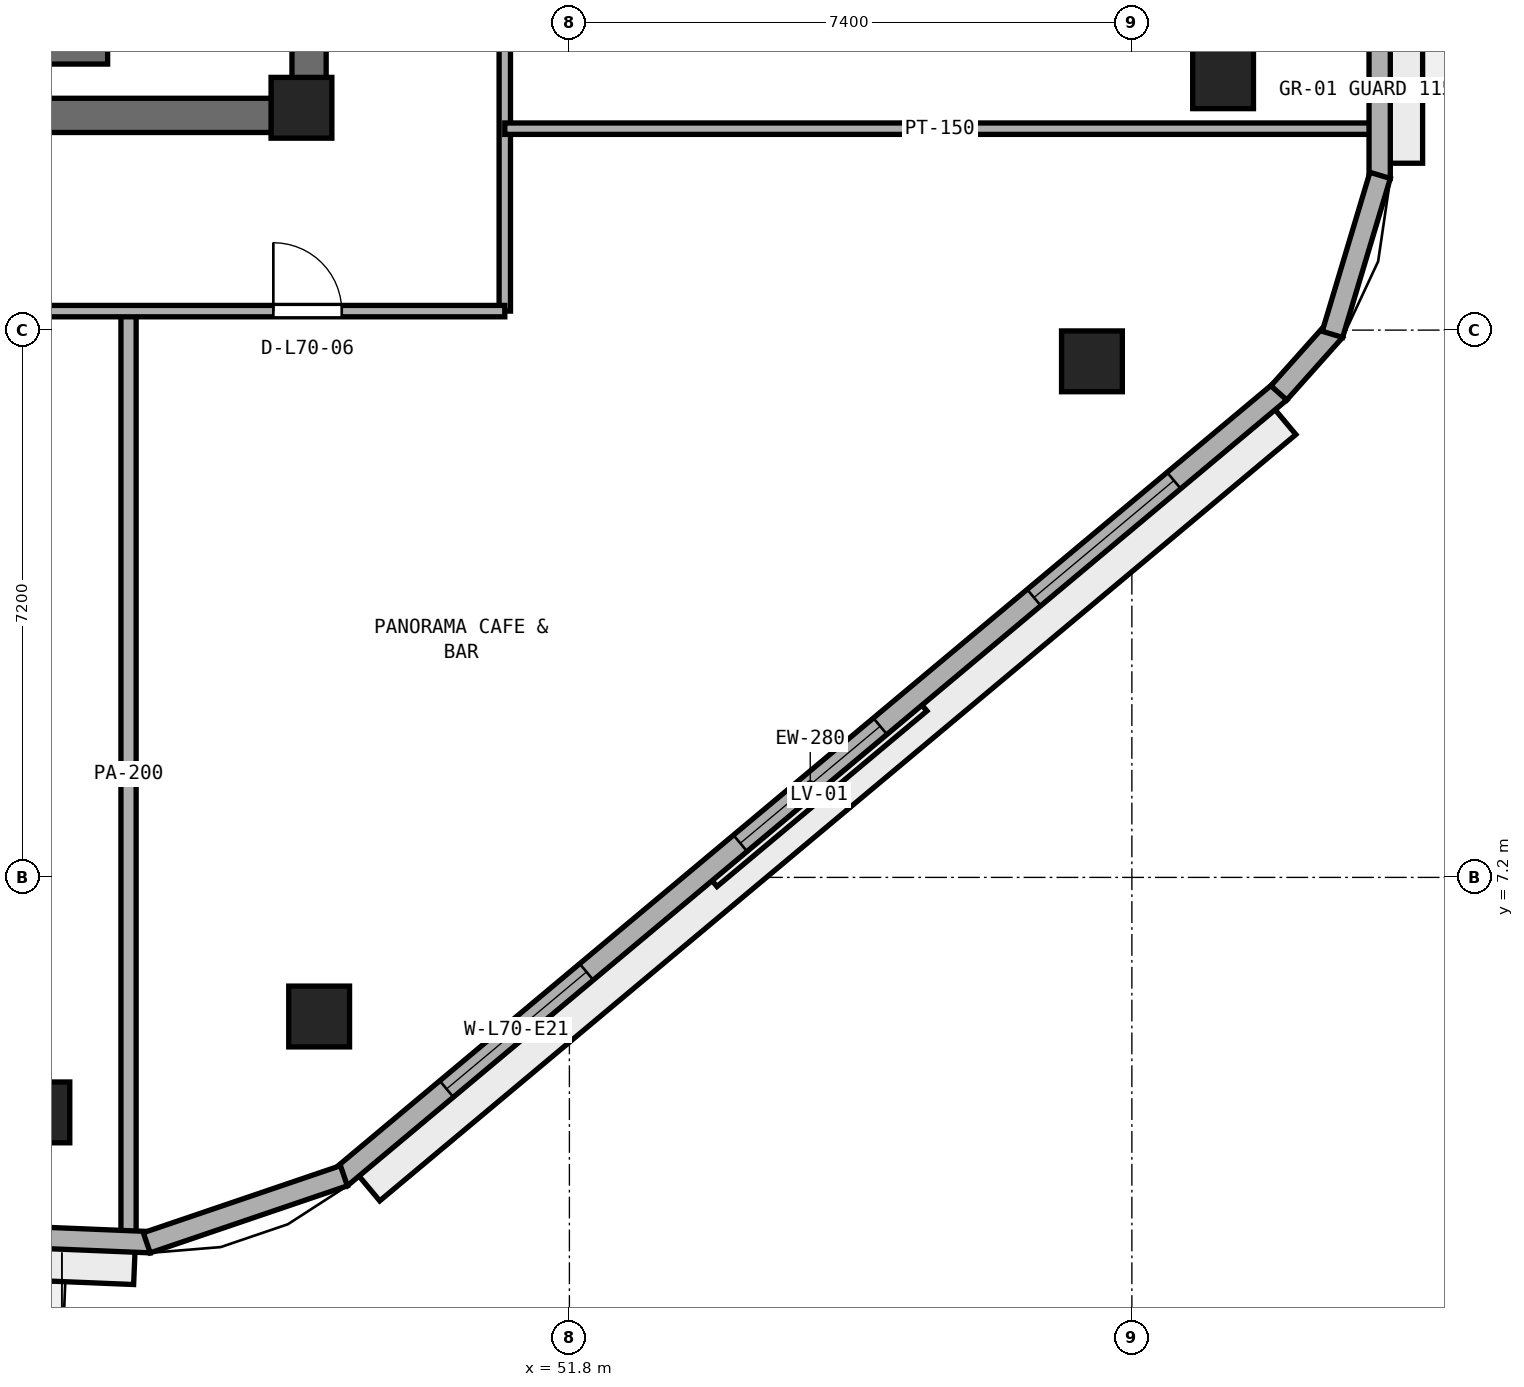
"""IFC4 building model, lengths in metres.
Left out: names, types, materials, properties, quantities, classifications, styles, units other than length and angle.
Written with IfcOpenShell. Run it as: python <this file> out.ifc"""

import sys

from ifc_helpers import new_model, si_unit, direction, frame, frame_2d, origin, origin_2d, place, context, subcontext, project, spatial, rectangle, extrude, element, fill, save


model = new_model("IFC4")
c1 = context("Model", 3, precision=1e-05, world=origin(), true_north=direction((0.0, 1.0)))
c2 = subcontext(c1, "Body", "Model", "MODEL_VIEW")
j1 = project(units=[si_unit("LENGTHUNIT", "METRE"), si_unit("PLANEANGLEUNIT", "RADIAN")], contexts=[c1])
p1 = place(None, origin())
s1 = spatial("IfcSite", under=j1, at=p1, CompositionType="ELEMENT")
p2 = place(p1, origin())
s2 = spatial("IfcBuilding", under=s1, at=p2, CompositionType="ELEMENT")
p3 = place(p2, frame((0.0, 0.0, 274.4)))
s3 = spatial("IfcBuildingStorey", under=s2, at=p3, CompositionType="ELEMENT", Elevation=274.4)
p4 = place(p3, frame((25.4, 17.225, 0.0), z_axis=(0.0, 0.0, 1.0), x_axis=(1.0, 0.0, 0.0)))
e1 = element("IfcWall", 1, at=p4, inside=s3, PredefinedType="SHEAR", context=c2, shape_type="SweptSolid", body=[
    extrude(rectangle(XDim=23.2, YDim=0.45, at=frame_2d((11.6, 0.0))), origin(), (0.0, 0.0, 1.0), 3.54),
])
p5 = place(p3, frame((48.375, 17.45, 0.0), z_axis=(0.0, 0.0, 1.0), x_axis=(0.0, 1.0, 0.0)))
e2 = element("IfcWall", 2, at=p5, inside=s3, PredefinedType="SHEAR", context=c2, shape_type="SweptSolid", body=[
    extrude(rectangle(XDim=15.5, YDim=0.45, at=frame_2d((7.75, 0.0))), origin(), (0.0, 0.0, 1.0), 3.54),
])
p6 = place(p5, frame((5.85, 0.0, 0.0)))
e3 = element("IfcOpeningElement", 3, at=p6, cuts=e2, PredefinedType="OPENING", context=c2, shape_type="SweptSolid", body=[
    extrude(rectangle(XDim=1.5, YDim=2.15, at=frame_2d((0.75, 1.075))), frame((0.0, 0.235, 0.0), z_axis=(0.0, -1.0, 0.0), x_axis=(1.0, 0.0, 0.0)), (0.0, 0.0, 1.0), 0.47),
])
p7 = place(p3, frame((48.275, 17.325, 0.0), z_axis=(0.0, 0.0, 1.0), x_axis=(1.0, 0.0, 0.0)))
e4 = element("IfcColumn", 4, at=p7, inside=s3, PredefinedType="PILASTER", context=c2, shape_type="SweptSolid", body=[
    extrude(rectangle(XDim=0.8, YDim=0.8, at=origin_2d()), origin(), (0.0, 0.0, 1.0), 3.8),
])
for number, where, z_axis, x_axis in (
    (5, (44.827, 4.108, 0.0), (0.0, 0.0, 1.0), (1.0, 0.0, 0.0)),
    (6, (48.508, 5.37, 0.0), (0.0, 0.0, 1.0), (1.0, 0.0, 0.0)),
    (7, (58.675, 13.989, 0.0), (0.0, 0.0, 1.0), (1.0, 0.0, 0.0)),
    (8, (60.4, 17.714, 0.0), (0.0, 0.0, 1.0), (1.0, 0.0, 0.0)),
):
    element("IfcColumn", number, at=place(p3, frame(where, z_axis=z_axis, x_axis=x_axis)), inside=s3, PredefinedType="COLUMN", context=c2, shape_type="SweptSolid", body=[
        extrude(rectangle(XDim=0.8, YDim=0.8, at=origin_2d()), origin(), (0.0, 0.0, 1.0), 3.8),
    ])
p8 = place(p3, frame((38.425, 18.025, 0.0), z_axis=(0.0, 0.0, 1.0), x_axis=(1.0, 0.0, 0.0)))
e9 = element("IfcWall", 9, at=p8, inside=s3, PredefinedType="SHEAR", context=c2, shape_type="SweptSolid", body=[
    extrude(rectangle(XDim=7.3, YDim=0.25, at=frame_2d((3.65, 0.0))), origin(), (0.0, 0.0, 1.0), 3.54),
])
p9 = place(p3, frame((50.95, 14.65, 0.0), z_axis=(0.0, 0.0, 1.0), x_axis=(0.0, 1.0, 0.0)))
e10 = element("IfcWall", 10, at=p9, inside=s3, PredefinedType="PARTITIONING", context=c2, shape_type="SweptSolid", body=[
    extrude(rectangle(XDim=13.15, YDim=0.15, at=frame_2d((6.575, 0.0))), origin(), (0.0, 0.0, 1.0), 3.54),
])
p10 = place(p9, frame((4.275, 0.0, 0.0)))
e11 = element("IfcOpeningElement", 11, at=p10, cuts=e10, PredefinedType="OPENING", context=c2, shape_type="SweptSolid", body=[
    extrude(rectangle(XDim=0.9, YDim=2.1, at=frame_2d((0.45, 1.05))), frame((0.0, 0.085, 0.0), z_axis=(0.0, -1.0, 0.0), x_axis=(1.0, 0.0, 0.0)), (0.0, 0.0, 1.0), 0.17),
])
p11 = place(p9, frame((9.53, 0.0, 0.0)))
e12 = element("IfcOpeningElement", 12, at=p11, cuts=e10, PredefinedType="OPENING", context=c2, shape_type="SweptSolid", body=[
    extrude(rectangle(XDim=0.9, YDim=2.1, at=frame_2d((0.45, 1.05))), frame((0.0, 0.085, 0.0), z_axis=(0.0, -1.0, 0.0), x_axis=(1.0, 0.0, 0.0)), (0.0, 0.0, 1.0), 0.17),
])
p12 = place(p3, frame((46.0, 2.477, 0.0), z_axis=(0.0, 0.0, 1.0), x_axis=(0.0, 1.0, 0.0)))
e13 = element("IfcWall", 13, at=p12, inside=s3, PredefinedType="PARTITIONING", context=c2, shape_type="SweptSolid", body=[
    extrude(rectangle(XDim=12.173, YDim=0.2, at=frame_2d((6.086, 0.0))), origin(), (0.0, 0.0, 1.0), 3.54),
])
p13 = place(p3, frame((38.35, 14.65, 0.0), z_axis=(0.0, 0.0, 1.0), x_axis=(1.0, 0.0, 0.0)))
e14 = element("IfcWall", 14, at=p13, inside=s3, PredefinedType="PARTITIONING", context=c2, shape_type="SweptSolid", body=[
    extrude(rectangle(XDim=12.6, YDim=0.15, at=frame_2d((6.3, 0.0))), origin(), (0.0, 0.0, 1.0), 3.54),
])
p14 = place(p13, frame((9.555, 0.0, 0.0)))
e15 = element("IfcOpeningElement", 15, at=p14, cuts=e14, PredefinedType="OPENING", context=c2, shape_type="SweptSolid", body=[
    extrude(rectangle(XDim=0.9, YDim=2.1, at=frame_2d((0.45, 1.05))), frame((0.0, 0.085, 0.0), z_axis=(0.0, -1.0, 0.0), x_axis=(1.0, 0.0, 0.0)), (0.0, 0.0, 1.0), 0.17),
])
p15 = place(p3, frame((50.95, 17.05, 0.0), z_axis=(0.0, 0.0, 1.0), x_axis=(1.0, 0.0, 0.0)))
e16 = element("IfcWall", 16, at=p15, inside=s3, PredefinedType="PARTITIONING", context=c2, shape_type="SweptSolid", body=[
    extrude(rectangle(XDim=11.445, YDim=0.15, at=frame_2d((5.723, 0.0))), origin(), (0.0, 0.0, 1.0), 3.54),
])
p16 = place(p3, frame((29.428, 3.093, 0.0), z_axis=(0.0, 0.0, 1.0), x_axis=(0.999156257967, -0.041070331944, 0.0)))
e17 = element("IfcWall", 17, at=p16, inside=s3, PredefinedType="STANDARD", context=c2, shape_type="SweptSolid", body=[
    extrude(rectangle(XDim=16.876, YDim=0.28, at=frame_2d((8.438, 0.0))), origin(), (0.0, 0.0, 1.0), 3.54),
])
p17 = place(p16, frame((7.588, 0.0, 0.0)))
e18 = element("IfcOpeningElement", 18, at=p17, cuts=e17, PredefinedType="OPENING", context=c2, shape_type="SweptSolid", body=[
    extrude(rectangle(XDim=1.1, YDim=2.2, at=frame_2d((0.55, 1.1))), frame((0.0, 0.15, 0.0), z_axis=(0.0, -1.0, 0.0), x_axis=(1.0, 0.0, 0.0)), (0.0, 0.0, 1.0), 0.3),
])
p18 = place(p16, frame((1.946, 0.0, 0.9)))
e19 = element("IfcOpeningElement", 19, at=p18, cuts=e17, PredefinedType="OPENING", context=c2, shape_type="SweptSolid", body=[
    extrude(rectangle(XDim=2.4, YDim=1.75, at=frame_2d((1.2, 0.875))), frame((0.0, 0.15, 0.0), z_axis=(0.0, -1.0, 0.0), x_axis=(1.0, 0.0, 0.0)), (0.0, 0.0, 1.0), 0.3),
])
p19 = place(p16, frame((12.53, 0.0, 0.9)))
e20 = element("IfcOpeningElement", 20, at=p19, cuts=e17, PredefinedType="OPENING", context=c2, shape_type="SweptSolid", body=[
    extrude(rectangle(XDim=2.4, YDim=1.75, at=frame_2d((1.2, 0.875))), frame((0.0, 0.15, 0.0), z_axis=(0.0, -1.0, 0.0), x_axis=(1.0, 0.0, 0.0)), (0.0, 0.0, 1.0), 0.3),
])
p20 = place(p3, frame((48.789, 3.25, 0.0), z_axis=(0.0, 0.0, 1.0), x_axis=(0.767032672101, 0.641608042288, 0.0)))
e21 = element("IfcWall", 21, at=p20, inside=s3, PredefinedType="STANDARD", context=c2, shape_type="SweptSolid", body=[
    extrude(rectangle(XDim=16.113, YDim=0.28, at=frame_2d((8.057, 0.0))), origin(), (0.0, 0.0, 1.0), 3.54),
])
p21 = place(p20, frame((1.819, 0.0, 0.9)))
e22 = element("IfcOpeningElement", 22, at=p21, cuts=e21, PredefinedType="OPENING", context=c2, shape_type="SweptSolid", body=[
    extrude(rectangle(XDim=2.4, YDim=1.75, at=frame_2d((1.2, 0.875))), frame((0.0, 0.15, 0.0), z_axis=(0.0, -1.0, 0.0), x_axis=(1.0, 0.0, 0.0)), (0.0, 0.0, 1.0), 0.3),
])
p22 = place(p20, frame((6.857, 0.0, 0.9)))
e23 = element("IfcOpeningElement", 23, at=p22, cuts=e21, PredefinedType="OPENING", context=c2, shape_type="SweptSolid", body=[
    extrude(rectangle(XDim=2.4, YDim=1.75, at=frame_2d((1.2, 0.875))), frame((0.0, 0.15, 0.0), z_axis=(0.0, -1.0, 0.0), x_axis=(1.0, 0.0, 0.0)), (0.0, 0.0, 1.0), 0.3),
])
p23 = place(p20, frame((11.895, 0.0, 0.9)))
e24 = element("IfcOpeningElement", 24, at=p23, cuts=e21, PredefinedType="OPENING", context=c2, shape_type="SweptSolid", body=[
    extrude(rectangle(XDim=2.4, YDim=1.75, at=frame_2d((1.2, 0.875))), frame((0.0, 0.15, 0.0), z_axis=(0.0, -1.0, 0.0), x_axis=(1.0, 0.0, 0.0)), (0.0, 0.0, 1.0), 0.3),
])
p24 = place(p3, frame((62.46, 16.396, 0.0), z_axis=(0.0, 0.0, 1.0), x_axis=(0.0, 1.0, 0.0)))
e25 = element("IfcWall", 25, at=p24, inside=s3, PredefinedType="STANDARD", context=c2, shape_type="SweptSolid", body=[
    extrude(rectangle(XDim=18.854, YDim=0.28, at=frame_2d((9.427, 0.0))), origin(), (0.0, 0.0, 1.0), 3.54),
])
p25 = place(p24, frame((8.877, 0.0, 0.0)))
e26 = element("IfcOpeningElement", 26, at=p25, cuts=e25, PredefinedType="OPENING", context=c2, shape_type="SweptSolid", body=[
    extrude(rectangle(XDim=1.1, YDim=2.2, at=frame_2d((0.55, 1.1))), frame((0.0, 0.15, 0.0), z_axis=(0.0, -1.0, 0.0), x_axis=(1.0, 0.0, 0.0)), (0.0, 0.0, 1.0), 0.3),
])
p26 = place(p24, frame((2.276, 0.0, 0.9)))
e27 = element("IfcOpeningElement", 27, at=p26, cuts=e25, PredefinedType="OPENING", context=c2, shape_type="SweptSolid", body=[
    extrude(rectangle(XDim=2.4, YDim=1.75, at=frame_2d((1.2, 0.875))), frame((0.0, 0.15, 0.0), z_axis=(0.0, -1.0, 0.0), x_axis=(1.0, 0.0, 0.0)), (0.0, 0.0, 1.0), 0.3),
])
p27 = place(p24, frame((14.179, 0.0, 0.9)))
e28 = element("IfcOpeningElement", 28, at=p27, cuts=e25, PredefinedType="OPENING", context=c2, shape_type="SweptSolid", body=[
    extrude(rectangle(XDim=2.4, YDim=1.75, at=frame_2d((1.2, 0.875))), frame((0.0, 0.15, 0.0), z_axis=(0.0, -1.0, 0.0), x_axis=(1.0, 0.0, 0.0)), (0.0, 0.0, 1.0), 0.3),
])
p28 = place(p3, frame((46.24, 2.393, 0.0), z_axis=(0.0, 0.0, 1.0), x_axis=(0.946759165502, 0.321942669643, 0.0)))
e29 = element("IfcWall", 29, at=p28, inside=s3, PredefinedType="STANDARD", context=c2, shape_type="SweptSolid", body=[
    extrude(rectangle(XDim=2.74, YDim=0.28, at=frame_2d((1.37, 0.0))), origin(), (0.0, 0.0, 1.0), 3.54),
])
p29 = place(p3, frame((61.134, 13.574, 0.0), z_axis=(0.0, 0.0, 1.0), x_axis=(0.665804679247, 0.74612608123, 0.0)))
e30 = element("IfcWall", 30, at=p29, inside=s3, PredefinedType="STANDARD", context=c2, shape_type="SweptSolid", body=[
    extrude(rectangle(XDim=1.103, YDim=0.28, at=frame_2d((0.552, 0.0))), origin(), (0.0, 0.0, 1.0), 3.54),
])
p30 = place(p3, frame((61.839, 14.344, 0.0), z_axis=(0.0, 0.0, 1.0), x_axis=(0.287235049694, 0.957860128739, 0.0)))
e31 = element("IfcWall", 31, at=p30, inside=s3, PredefinedType="STANDARD", context=c2, shape_type="SweptSolid", body=[
    extrude(rectangle(XDim=2.184, YDim=0.28, at=frame_2d((1.092, 0.0))), origin(), (0.0, 0.0, 1.0), 3.54),
])
p31 = place(p14, origin())
e32 = element("IfcDoor", 32, at=p31, inside=s3, OperationType="SINGLE_SWING_LEFT", PredefinedType="DOOR", context=c2, shape_type="SweptSolid", body=[
    extrude(rectangle(XDim=0.9, YDim=2.1, at=frame_2d((0.45, 1.05))), frame((0.0, 0.025, 0.0), z_axis=(0.0, -1.0, 0.0), x_axis=(1.0, 0.0, 0.0)), (0.0, 0.0, 1.0), 0.05),
])
fill(e15, e32)
p32 = place(p21, origin())
e33 = element("IfcWindow", 33, at=p32, inside=s3, PartitioningType="SINGLE_PANEL", PredefinedType="WINDOW", context=c2, shape_type="SweptSolid", body=[
    extrude(rectangle(XDim=2.4, YDim=1.75, at=frame_2d((1.2, 0.875))), frame((0.0, 0.03, 0.0), z_axis=(0.0, -1.0, 0.0), x_axis=(1.0, 0.0, 0.0)), (0.0, 0.0, 1.0), 0.06),
])
fill(e22, e33)
p33 = place(p22, origin())
e34 = element("IfcWindow", 34, at=p33, inside=s3, PartitioningType="SINGLE_PANEL", PredefinedType="WINDOW", context=c2, shape_type="SweptSolid", body=[
    extrude(rectangle(XDim=2.4, YDim=1.75, at=frame_2d((1.2, 0.875))), frame((0.0, 0.03, 0.0), z_axis=(0.0, -1.0, 0.0), x_axis=(1.0, 0.0, 0.0)), (0.0, 0.0, 1.0), 0.06),
])
fill(e23, e34)
p34 = place(p23, origin())
e35 = element("IfcWindow", 35, at=p34, inside=s3, PartitioningType="SINGLE_PANEL", PredefinedType="WINDOW", context=c2, shape_type="SweptSolid", body=[
    extrude(rectangle(XDim=2.4, YDim=1.75, at=frame_2d((1.2, 0.875))), frame((0.0, 0.03, 0.0), z_axis=(0.0, -1.0, 0.0), x_axis=(1.0, 0.0, 0.0)), (0.0, 0.0, 1.0), 0.06),
])
fill(e24, e35)
save(model, sys.argv[1])
